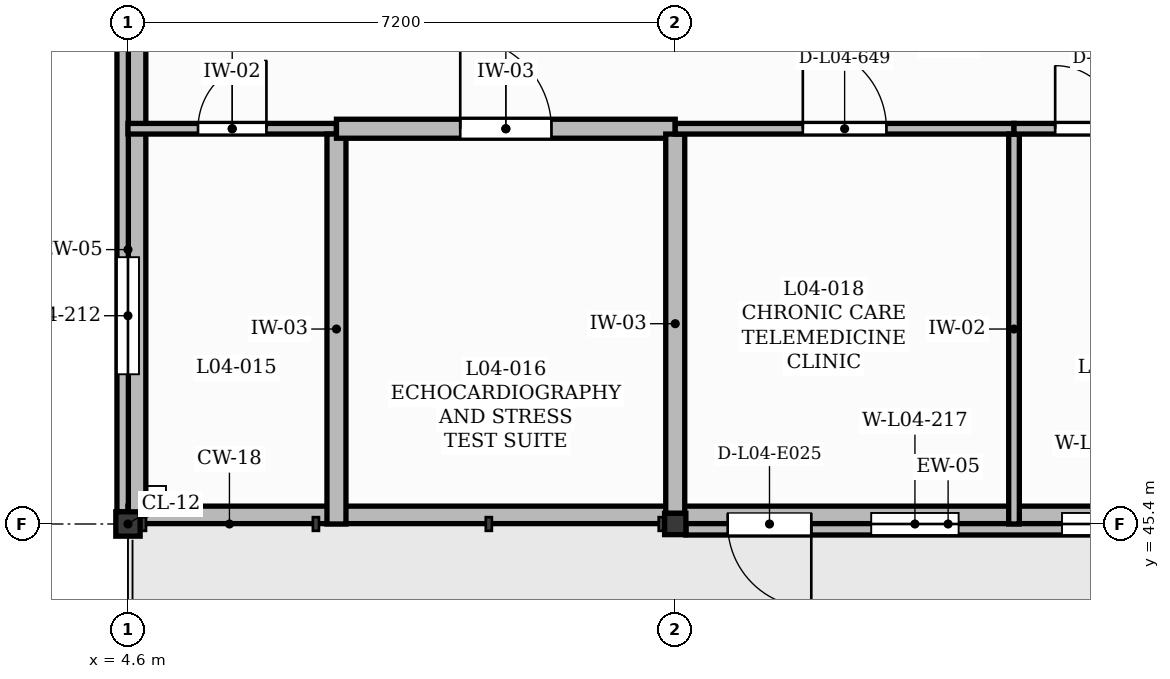
"""IFC4 building model, lengths in metres.
Left out: names, types, materials, properties, quantities, classifications, styles, units other than length and angle.
Written with IfcOpenShell. Run it as: python <this file> out.ifc"""

import sys

from ifc_helpers import new_model, si_unit, direction, frame, frame_2d, origin, origin_2d, place, context, subcontext, project, spatial, polyline, rectangle, outline, extrude, element, fill, save


model = new_model("IFC4")
c1 = context("Model", 3, precision=1e-05, world=origin(), true_north=direction((0.0, 1.0)))
c2 = subcontext(c1, "Body", "Model", "MODEL_VIEW")
j1 = project(units=[si_unit("LENGTHUNIT", "METRE"), si_unit("PLANEANGLEUNIT", "RADIAN")], contexts=[c1])
p1 = place(None, origin())
s1 = spatial("IfcSite", under=j1, at=p1, CompositionType="ELEMENT")
p2 = place(p1, origin())
s2 = spatial("IfcBuilding", under=s1, at=p2, CompositionType="ELEMENT")
p3 = place(p2, frame((0.0, 0.0, 17.4)))
s3 = spatial("IfcBuildingStorey", under=s2, at=p3, CompositionType="ELEMENT", Elevation=17.4)
p4 = place(p3, frame((4.6, 45.4, 0.0), z_axis=(0.0, 0.0, 1.0), x_axis=(1.0, 0.0, 0.0)))
e1 = element("IfcColumn", 1, at=p4, inside=s3, PredefinedType="COLUMN", context=c2, shape_type="SweptSolid", body=[
    extrude(rectangle(XDim=0.32, YDim=0.32, at=origin_2d()), origin(), (0.0, 0.0, 1.0), 3.95),
])
p5 = place(p3, frame((11.8, 45.4, 0.0), z_axis=(0.0, 0.0, 1.0), x_axis=(1.0, 0.0, 0.0)))
e2 = element("IfcColumn", 2, at=p5, inside=s3, PredefinedType="COLUMN", context=c2, shape_type="SweptSolid", body=[
    extrude(rectangle(XDim=0.28, YDim=0.28, at=origin_2d()), origin(), (0.0, 0.0, 1.0), 3.95),
])
p6 = place(p3, frame((4.6, 45.56, 0.0), z_axis=(0.0, 0.0, 1.0), x_axis=(0.0, 1.0, 0.0)))
e3 = element("IfcWall", 3, at=p6, inside=s3, PredefinedType="SOLIDWALL", context=c2, shape_type="SweptSolid", body=[
    extrude(rectangle(XDim=6.9, YDim=0.29, at=frame_2d((3.45, 0.0))), origin(), (0.0, 0.0, 1.0), 3.49),
])
p7 = place(p6, frame((1.81, 0.0, 1.05)))
e4 = element("IfcOpeningElement", 4, at=p7, cuts=e3, PredefinedType="OPENING", context=c2, shape_type="SweptSolid", body=[
    extrude(rectangle(XDim=1.54, YDim=1.65, at=frame_2d((0.77, 0.825))), frame((0.0, 0.155, 0.0), z_axis=(0.0, -1.0, 0.0), x_axis=(1.0, 0.0, 0.0)), (0.0, 0.0, 1.0), 0.31),
])
p8 = place(p3, frame((11.94, 45.4, 0.0), z_axis=(0.0, 0.0, 1.0), x_axis=(1.0, 0.0, 0.0)))
e5 = element("IfcWall", 5, at=p8, inside=s3, PredefinedType="SOLIDWALL", context=c2, shape_type="SweptSolid", body=[
    extrude(rectangle(XDim=6.9, YDim=0.29, at=frame_2d((3.45, 0.0))), origin(), (0.0, 0.0, 1.0), 3.49),
])
p9 = place(p8, frame((0.55, 0.0, 0.0)))
e6 = element("IfcOpeningElement", 6, at=p9, cuts=e5, PredefinedType="OPENING", context=c2, shape_type="SweptSolid", body=[
    extrude(rectangle(XDim=1.1, YDim=2.25, at=frame_2d((0.55, 1.125))), frame((0.0, 0.155, 0.0), z_axis=(0.0, -1.0, 0.0), x_axis=(1.0, 0.0, 0.0)), (0.0, 0.0, 1.0), 0.31),
])
p10 = place(p8, frame((2.438, 0.0, 1.5)))
e7 = element("IfcOpeningElement", 7, at=p10, cuts=e5, PredefinedType="OPENING", context=c2, shape_type="SweptSolid", body=[
    extrude(rectangle(XDim=1.15, YDim=1.25, at=frame_2d((0.575, 0.625))), frame((0.0, 0.155, 0.0), z_axis=(0.0, -1.0, 0.0), x_axis=(1.0, 0.0, 0.0)), (0.0, 0.0, 1.0), 0.31),
])
p11 = place(p8, frame((4.948, 0.0, 1.0)))
e8 = element("IfcOpeningElement", 8, at=p11, cuts=e5, PredefinedType="OPENING", context=c2, shape_type="SweptSolid", body=[
    extrude(rectangle(XDim=1.2, YDim=1.95, at=frame_2d((0.6, 0.975))), frame((0.0, 0.155, 0.0), z_axis=(0.0, -1.0, 0.0), x_axis=(1.0, 0.0, 0.0)), (0.0, 0.0, 1.0), 0.31),
])
p12 = place(p3, frame((4.6, 45.52, 4.2), z_axis=(0.0, 0.0, 1.0), x_axis=(1.0, 0.0, 0.0)))
e9 = element("IfcWall", 9, at=p12, inside=s3, PredefinedType="PARAPET", context=c2, shape_type="SweptSolid", body=[
    extrude(outline(polyline([(0.0, 0.0), (50.4, 0.0), (50.4, 0.6), (39.312, 0.85), (39.312, 0.6), (32.256, 1.1), (32.256, 0.85), (18.144, 1.1), (18.144, 0.85), (11.088, 0.85), (11.088, 0.6), (0.0, 0.6), (0.0, 0.0)])), frame((0.0, 0.115, 0.0), z_axis=(0.0, -1.0, 0.0), x_axis=(1.0, 0.0, 0.0)), (0.0, 0.0, 1.0), 0.23),
])
p13 = place(p3, frame((4.72, 45.52, 4.2), z_axis=(0.0, 0.0, 1.0), x_axis=(0.0, 1.0, 0.0)))
e10 = element("IfcWall", 10, at=p13, inside=s3, PredefinedType="PARAPET", context=c2, shape_type="SweptSolid", body=[
    extrude(outline(polyline([(0.0, 0.0), (14.16, 0.0), (14.16, 0.65), (11.045, 0.9), (11.045, 0.65), (9.062, 1.15), (9.062, 0.9), (5.098, 1.15), (5.098, 0.9), (3.115, 0.9), (3.115, 0.65), (0.0, 0.65), (0.0, 0.0)])), frame((0.0, 0.115, 0.0), z_axis=(0.0, -1.0, 0.0), x_axis=(1.0, 0.0, 0.0)), (0.0, 0.0, 1.0), 0.23),
])
p14 = place(p3, frame((4.6, 50.6, 0.0), z_axis=(0.0, 0.0, 1.0), x_axis=(1.0, 0.0, 0.0)))
e11 = element("IfcWall", 11, at=p14, inside=s3, PredefinedType="PARTITIONING", context=c2, shape_type="SweptSolid", body=[
    extrude(rectangle(XDim=2.743, YDim=0.14, at=frame_2d((1.372, 0.0))), origin(), (0.0, 0.0, 1.0), 3.93),
])
p15 = place(p14, frame((0.921, 0.0, 0.0)))
e12 = element("IfcOpeningElement", 12, at=p15, cuts=e11, PredefinedType="OPENING", context=c2, shape_type="SweptSolid", body=[
    extrude(rectangle(XDim=0.9, YDim=2.1, at=frame_2d((0.45, 1.05))), frame((0.0, 0.08, 0.0), z_axis=(0.0, -1.0, 0.0), x_axis=(1.0, 0.0, 0.0)), (0.0, 0.0, 1.0), 0.16),
])
p16 = place(p3, frame((7.343, 45.4, 0.0), z_axis=(0.0, 0.0, 1.0), x_axis=(0.0, 1.0, 0.0)))
e13 = element("IfcWall", 13, at=p16, inside=s3, PredefinedType="SOLIDWALL", context=c2, shape_type="SweptSolid", body=[
    extrude(rectangle(XDim=5.13, YDim=0.25, at=frame_2d((2.565, 0.0))), origin(), (0.0, 0.0, 1.0), 3.93),
])
p17 = place(p3, frame((7.343, 50.6, 0.0), z_axis=(0.0, 0.0, 1.0), x_axis=(1.0, 0.0, 0.0)))
e14 = element("IfcWall", 14, at=p17, inside=s3, PredefinedType="SOLIDWALL", context=c2, shape_type="SweptSolid", body=[
    extrude(rectangle(XDim=4.457, YDim=0.25, at=frame_2d((2.229, 0.0))), origin(), (0.0, 0.0, 1.0), 3.93),
])
p18 = place(p17, frame((1.628, 0.0, 0.0)))
e15 = element("IfcOpeningElement", 15, at=p18, cuts=e14, PredefinedType="OPENING", context=c2, shape_type="SweptSolid", body=[
    extrude(rectangle(XDim=1.2, YDim=2.15, at=frame_2d((0.6, 1.075))), frame((0.0, 0.135, 0.0), z_axis=(0.0, -1.0, 0.0), x_axis=(1.0, 0.0, 0.0)), (0.0, 0.0, 1.0), 0.27),
])
p19 = place(p3, frame((11.8, 45.54, 0.0), z_axis=(0.0, 0.0, 1.0), x_axis=(0.0, 1.0, 0.0)))
e16 = element("IfcWall", 16, at=p19, inside=s3, PredefinedType="SOLIDWALL", context=c2, shape_type="SweptSolid", body=[
    extrude(rectangle(XDim=4.99, YDim=0.25, at=frame_2d((2.495, 0.0))), origin(), (0.0, 0.0, 1.0), 3.49),
])
p20 = place(p3, frame((11.8, 50.6, 0.0), z_axis=(0.0, 0.0, 1.0), x_axis=(1.0, 0.0, 0.0)))
e17 = element("IfcWall", 17, at=p20, inside=s3, PredefinedType="PARTITIONING", context=c2, shape_type="SweptSolid", body=[
    extrude(rectangle(XDim=4.457, YDim=0.14, at=frame_2d((2.229, 0.0))), origin(), (0.0, 0.0, 1.0), 3.93),
])
p21 = place(p20, frame((1.678, 0.0, 0.0)))
e18 = element("IfcOpeningElement", 18, at=p21, cuts=e17, PredefinedType="OPENING", context=c2, shape_type="SweptSolid", body=[
    extrude(rectangle(XDim=1.1, YDim=2.1, at=frame_2d((0.55, 1.05))), frame((0.0, 0.08, 0.0), z_axis=(0.0, -1.0, 0.0), x_axis=(1.0, 0.0, 0.0)), (0.0, 0.0, 1.0), 0.16),
])
p22 = place(p3, frame((16.257, 45.4, 0.0), z_axis=(0.0, 0.0, 1.0), x_axis=(0.0, 1.0, 0.0)))
e19 = element("IfcWall", 19, at=p22, inside=s3, PredefinedType="PARTITIONING", context=c2, shape_type="SweptSolid", body=[
    extrude(rectangle(XDim=5.13, YDim=0.14, at=frame_2d((2.565, 0.0))), origin(), (0.0, 0.0, 1.0), 3.93),
])
p23 = place(p3, frame((16.257, 50.6, 0.0), z_axis=(0.0, 0.0, 1.0), x_axis=(1.0, 0.0, 0.0)))
e20 = element("IfcWall", 20, at=p23, inside=s3, PredefinedType="PARTITIONING", context=c2, shape_type="SweptSolid", body=[
    extrude(rectangle(XDim=2.743, YDim=0.14, at=frame_2d((1.372, 0.0))), origin(), (0.0, 0.0, 1.0), 3.93),
])
p24 = place(p23, frame((0.542, 0.0, 0.0)))
e21 = element("IfcOpeningElement", 21, at=p24, cuts=e20, PredefinedType="OPENING", context=c2, shape_type="SweptSolid", body=[
    extrude(rectangle(XDim=1.66, YDim=2.3, at=frame_2d((0.83, 1.15))), frame((0.0, 0.08, 0.0), z_axis=(0.0, -1.0, 0.0), x_axis=(1.0, 0.0, 0.0)), (0.0, 0.0, 1.0), 0.16),
])
p25 = place(p7, origin())
e22 = element("IfcWindow", 22, at=p25, inside=s3, PartitioningType="DOUBLE_PANEL_VERTICAL", PredefinedType="WINDOW", context=c2, shape_type="SweptSolid", body=[
    extrude(rectangle(XDim=1.54, YDim=1.65, at=frame_2d((0.77, 0.825))), frame((0.0, 0.03, 0.0), z_axis=(0.0, -1.0, 0.0), x_axis=(1.0, 0.0, 0.0)), (0.0, 0.0, 1.0), 0.06),
])
fill(e4, e22)
p26 = place(p9, frame((1.1, 0.0, 0.0), z_axis=(0.0, 0.0, 1.0), x_axis=(-1.0, 0.0, 0.0)))
e23 = element("IfcDoor", 23, at=p26, inside=s3, OperationType="SINGLE_SWING_LEFT", PredefinedType="DOOR", context=c2, shape_type="SweptSolid", body=[
    extrude(rectangle(XDim=1.1, YDim=2.25, at=frame_2d((0.55, 1.125))), frame((0.0, 0.025, 0.0), z_axis=(0.0, -1.0, 0.0), x_axis=(1.0, 0.0, 0.0)), (0.0, 0.0, 1.0), 0.05),
])
fill(e6, e23)
p27 = place(p10, origin())
e24 = element("IfcWindow", 24, at=p27, inside=s3, PartitioningType="SINGLE_PANEL", PredefinedType="WINDOW", context=c2, shape_type="SweptSolid", body=[
    extrude(rectangle(XDim=1.15, YDim=1.25, at=frame_2d((0.575, 0.625))), frame((0.0, 0.03, 0.0), z_axis=(0.0, -1.0, 0.0), x_axis=(1.0, 0.0, 0.0)), (0.0, 0.0, 1.0), 0.06),
])
fill(e7, e24)
p28 = place(p11, origin())
e25 = element("IfcWindow", 25, at=p28, inside=s3, PartitioningType="SINGLE_PANEL", PredefinedType="WINDOW", context=c2, shape_type="SweptSolid", body=[
    extrude(rectangle(XDim=1.2, YDim=1.95, at=frame_2d((0.6, 0.975))), frame((0.0, 0.03, 0.0), z_axis=(0.0, -1.0, 0.0), x_axis=(1.0, 0.0, 0.0)), (0.0, 0.0, 1.0), 0.06),
])
fill(e8, e25)
p29 = place(p15, origin())
e26 = element("IfcDoor", 26, at=p29, inside=s3, OperationType="SINGLE_SWING_RIGHT", PredefinedType="DOOR", context=c2, shape_type="SweptSolid", body=[
    extrude(rectangle(XDim=0.9, YDim=2.1, at=frame_2d((0.45, 1.05))), frame((0.0, 0.025, 0.0), z_axis=(0.0, -1.0, 0.0), x_axis=(1.0, 0.0, 0.0)), (0.0, 0.0, 1.0), 0.05),
])
fill(e12, e26)
p30 = place(p18, origin())
e27 = element("IfcDoor", 27, at=p30, inside=s3, OperationType="SINGLE_SWING_LEFT", PredefinedType="DOOR", context=c2, shape_type="SweptSolid", body=[
    extrude(rectangle(XDim=1.2, YDim=2.15, at=frame_2d((0.6, 1.075))), frame((0.0, 0.025, 0.0), z_axis=(0.0, -1.0, 0.0), x_axis=(1.0, 0.0, 0.0)), (0.0, 0.0, 1.0), 0.05),
])
fill(e15, e27)
p31 = place(p21, origin())
e28 = element("IfcDoor", 28, at=p31, inside=s3, OperationType="SINGLE_SWING_LEFT", PredefinedType="DOOR", context=c2, shape_type="SweptSolid", body=[
    extrude(rectangle(XDim=1.1, YDim=2.1, at=frame_2d((0.55, 1.05))), frame((0.0, 0.025, 0.0), z_axis=(0.0, -1.0, 0.0), x_axis=(1.0, 0.0, 0.0)), (0.0, 0.0, 1.0), 0.05),
])
fill(e18, e28)
p32 = place(p24, origin())
e29 = element("IfcDoor", 29, at=p32, inside=s3, OperationType="DOUBLE_DOOR_SINGLE_SWING", PredefinedType="DOOR", context=c2, shape_type="SweptSolid", body=[
    extrude(rectangle(XDim=1.66, YDim=2.3, at=frame_2d((0.83, 1.15))), frame((0.0, 0.025, 0.0), z_axis=(0.0, -1.0, 0.0), x_axis=(1.0, 0.0, 0.0)), (0.0, 0.0, 1.0), 0.05),
])
fill(e21, e29)
save(model, sys.argv[1])
